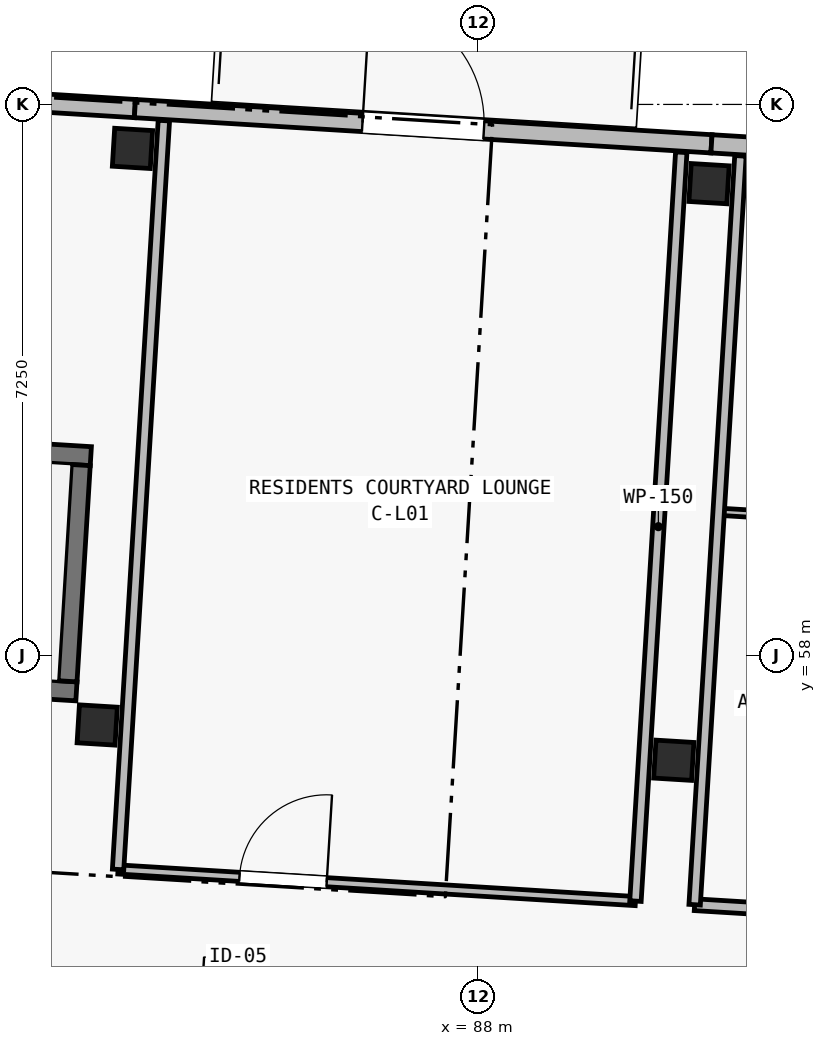
"""IFC4 building model, lengths in metres.
Left out: names, types, materials, properties, quantities, classifications, styles, units other than length and angle.
Written with IfcOpenShell. Run it as: python <this file> out.ifc"""

import sys

from ifc_helpers import new_model, si_unit, direction, frame, frame_2d, origin, origin_2d, place, context, subcontext, project, spatial, rectangle, extrude, element, fill, save


model = new_model("IFC4")
c1 = context("Model", 3, precision=1e-05, world=origin(), true_north=direction((0.0, 1.0)))
c2 = subcontext(c1, "Body", "Model", "MODEL_VIEW")
j1 = project(units=[si_unit("LENGTHUNIT", "METRE"), si_unit("PLANEANGLEUNIT", "RADIAN")], contexts=[c1])
p1 = place(None, origin())
s1 = spatial("IfcSite", under=j1, at=p1, CompositionType="ELEMENT")
p2 = place(p1, origin())
s2 = spatial("IfcBuilding", under=s1, at=p2, CompositionType="ELEMENT")
p3 = place(p2, frame((0.0, 0.0, 4.5)))
s3 = spatial("IfcBuildingStorey", under=s2, at=p3, CompositionType="ELEMENT", Elevation=4.5)
for number, where, z_axis, x_axis in (
    (1, (82.99, 57.086, 0.0), (0.0, 0.0, 1.0), (0.998, -0.061, 0.0)),
    (2, (83.454, 64.672, 0.0), (0.0, 0.0, 1.0), (0.998, -0.061, 0.0)),
    (3, (90.576, 56.622, 0.0), (0.0, 0.0, 1.0), (0.998, -0.061, 0.0)),
    (4, (91.04, 64.208, 0.0), (0.0, 0.0, 1.0), (0.998, -0.061, 0.0)),
):
    element("IfcColumn", number, at=place(p3, frame(where, z_axis=z_axis, x_axis=x_axis)), inside=s3, PredefinedType="COLUMN", context=c2, shape_type="SweptSolid", body=[
        extrude(rectangle(XDim=0.5, YDim=0.5, at=origin_2d()), origin(), (0.0, 0.0, 1.0), 3.9),
    ])
p4 = place(p3, frame((75.919, 61.05, 0.0), z_axis=(0.0, 0.0, 1.0), x_axis=(0.998135546153, -0.061036313012, 0.0)))
e5 = element("IfcWall", 5, at=p4, inside=s3, PredefinedType="SHEAR", context=c2, shape_type="SweptSolid", body=[
    extrude(rectangle(XDim=7.0, YDim=0.25, at=frame_2d((3.5, 0.0))), origin(), (0.0, 0.0, 1.0), 3.9),
])
p5 = place(p4, frame((0.45, 0.0, 0.0)))
e6 = element("IfcOpeningElement", 6, at=p5, cuts=e5, PredefinedType="OPENING", context=c2, shape_type="SweptSolid", body=[
    extrude(rectangle(XDim=0.9, YDim=2.1, at=frame_2d((0.45, 1.05))), frame((0.0, 0.14, 0.0), z_axis=(0.0, -1.0, 0.0), x_axis=(1.0, 0.0, 0.0)), (0.0, 0.0, 1.0), 0.28),
])
p6 = place(p3, frame((75.73, 57.956, 0.0), z_axis=(0.0, 0.0, 1.0), x_axis=(0.998135546153, -0.061036313012, 0.0)))
e7 = element("IfcWall", 7, at=p6, inside=s3, PredefinedType="SHEAR", context=c2, shape_type="SweptSolid", body=[
    extrude(rectangle(XDim=7.0, YDim=0.25, at=frame_2d((3.5, 0.0))), origin(), (0.0, 0.0, 1.0), 3.9),
])
p7 = place(p6, frame((0.45, 0.0, 0.0)))
e8 = element("IfcOpeningElement", 8, at=p7, cuts=e7, PredefinedType="OPENING", context=c2, shape_type="SweptSolid", body=[
    extrude(rectangle(XDim=1.05, YDim=2.15, at=frame_2d((0.525, 1.075))), frame((0.0, 0.14, 0.0), z_axis=(0.0, -1.0, 0.0), x_axis=(1.0, 0.0, 0.0)), (0.0, 0.0, 1.0), 0.28),
])
p8 = place(p3, frame((82.599, 57.661, 0.0), z_axis=(0.0, 0.0, 1.0), x_axis=(0.06107697143, 0.998133059046, 0.0)))
e9 = element("IfcWall", 9, at=p8, inside=s3, PredefinedType="SHEAR", context=c2, shape_type="SweptSolid", body=[
    extrude(rectangle(XDim=2.85, YDim=0.25, at=frame_2d((1.425, 0.0))), origin(), (0.0, 0.0, 1.0), 3.9),
])
p9 = place(p3, frame((81.115, 65.341, 0.0), z_axis=(0.0, 0.0, 1.0), x_axis=(0.998134103342, -0.061059902923, 0.0)))
e10 = element("IfcWall", 10, at=p9, inside=s3, PredefinedType="SOLIDWALL", context=c2, shape_type="SweptSolid", body=[
    extrude(rectangle(XDim=2.375, YDim=0.24, at=frame_2d((1.188, 0.0))), origin(), (0.0, 0.0, 1.0), 3.65),
])
p10 = place(p3, frame((83.486, 65.196, 0.0), z_axis=(0.0, 0.0, 1.0), x_axis=(0.998135669243, -0.061034300063, 0.0)))
e11 = element("IfcWall", 11, at=p10, inside=s3, PredefinedType="SOLIDWALL", context=c2, shape_type="SweptSolid", body=[
    extrude(rectangle(XDim=7.6, YDim=0.24, at=frame_2d((3.8, 0.0))), origin(), (0.0, 0.0, 1.0), 3.65),
])
p11 = place(p10, frame((3.0, 0.0, 0.0)))
e12 = element("IfcOpeningElement", 12, at=p11, cuts=e11, PredefinedType="OPENING", context=c2, shape_type="SweptSolid", body=[
    extrude(rectangle(XDim=1.6, YDim=2.15, at=frame_2d((0.8, 1.075))), frame((0.0, 0.135, 0.0), z_axis=(0.0, -1.0, 0.0), x_axis=(1.0, 0.0, 0.0)), (0.0, 0.0, 1.0), 0.27),
])
p12 = place(p3, frame((91.072, 64.732, 0.0), z_axis=(0.0, 0.0, 1.0), x_axis=(0.998133591969, -0.061068261669, 0.0)))
e13 = element("IfcWall", 13, at=p12, inside=s3, PredefinedType="SOLIDWALL", context=c2, shape_type="SweptSolid", body=[
    extrude(rectangle(XDim=7.6, YDim=0.24, at=frame_2d((3.8, 0.0))), origin(), (0.0, 0.0, 1.0), 3.65),
])
p13 = place(p12, frame((0.902, 0.0, 0.5)))
e14 = element("IfcOpeningElement", 14, at=p13, cuts=e13, PredefinedType="OPENING", context=c2, shape_type="SweptSolid", body=[
    extrude(rectangle(XDim=0.78, YDim=2.2, at=frame_2d((0.39, 1.1))), frame((0.0, 0.135, 0.0), z_axis=(0.0, -1.0, 0.0), x_axis=(1.0, 0.0, 0.0)), (0.0, 0.0, 1.0), 0.27),
])
p14 = place(p12, frame((5.426, 0.0, 0.44)))
e15 = element("IfcOpeningElement", 15, at=p14, cuts=e13, PredefinedType="OPENING", context=c2, shape_type="SweptSolid", body=[
    extrude(rectangle(XDim=0.86, YDim=2.36, at=frame_2d((0.43, 1.18))), frame((0.0, 0.135, 0.0), z_axis=(0.0, -1.0, 0.0), x_axis=(1.0, 0.0, 0.0)), (0.0, 0.0, 1.0), 0.27),
])
p15 = place(p3, frame((83.265, 55.185, 0.0), z_axis=(0.0, 0.0, 1.0), x_axis=(0.998135531673, -0.061036549799, 0.0)))
e16 = element("IfcWall", 16, at=p15, inside=s3, PredefinedType="PARTITIONING", context=c2, shape_type="SweptSolid", body=[
    extrude(rectangle(XDim=6.82, YDim=0.12, at=frame_2d((3.41, 0.0))), origin(), (0.0, 0.0, 1.0), 3.62),
])
p16 = place(p15, frame((1.6, 0.0, 0.0)))
e17 = element("IfcOpeningElement", 17, at=p16, cuts=e16, PredefinedType="OPENING", context=c2, shape_type="SweptSolid", body=[
    extrude(rectangle(XDim=1.15, YDim=2.15, at=frame_2d((0.575, 1.075))), frame((0.0, 0.075, 0.0), z_axis=(0.0, -1.0, 0.0), x_axis=(1.0, 0.0, 0.0)), (0.0, 0.0, 1.0), 0.15),
])
p17 = place(p3, frame((83.265, 55.185, 0.0), z_axis=(0.0, 0.0, 1.0), x_axis=(0.061046193261, 0.998134941923, 0.0)))
e18 = element("IfcWall", 18, at=p17, inside=s3, PredefinedType="PARTITIONING", context=c2, shape_type="SweptSolid", body=[
    extrude(rectangle(XDim=9.87, YDim=0.15, at=frame_2d((4.935, 0.0))), origin(), (0.0, 0.0, 1.0), 3.62),
])
p18 = place(p3, frame((90.072, 54.769, 0.0), z_axis=(0.0, 0.0, 1.0), x_axis=(0.061047700465, 0.998134849741, 0.0)))
e19 = element("IfcWall", 19, at=p18, inside=s3, PredefinedType="PARTITIONING", context=c2, shape_type="SweptSolid", body=[
    extrude(rectangle(XDim=9.87, YDim=0.15, at=frame_2d((4.935, 0.0))), origin(), (0.0, 0.0, 1.0), 3.62),
])
p19 = place(p3, frame((90.85, 54.721, 0.0), z_axis=(0.0, 0.0, 1.0), x_axis=(0.998135665032, -0.06103436893, 0.0)))
e20 = element("IfcWall", 20, at=p19, inside=s3, PredefinedType="PARTITIONING", context=c2, shape_type="SweptSolid", body=[
    extrude(rectangle(XDim=6.82, YDim=0.155, at=frame_2d((3.41, 0.0))), origin(), (0.0, 0.0, 1.0), 3.62),
])
p20 = place(p19, frame((1.205, 0.0, 0.0)))
e21 = element("IfcOpeningElement", 21, at=p20, cuts=e20, PredefinedType="OPENING", context=c2, shape_type="SweptSolid", body=[
    extrude(rectangle(XDim=1.02, YDim=2.2, at=frame_2d((0.51, 1.1))), frame((0.0, 0.093, 0.0), z_axis=(0.0, -1.0, 0.0), x_axis=(1.0, 0.0, 0.0)), (0.0, 0.0, 1.0), 0.185),
])
p21 = place(p3, frame((91.167, 59.892, 0.0), z_axis=(0.0, 0.0, 1.0), x_axis=(0.998133617109, -0.061067850767, 0.0)))
e22 = element("IfcWall", 22, at=p21, inside=s3, PredefinedType="PARTITIONING", context=c2, shape_type="SweptSolid", body=[
    extrude(rectangle(XDim=3.41, YDim=0.095, at=frame_2d((1.705, 0.0))), origin(), (0.0, 0.0, 1.0), 3.62),
])
p22 = place(p21, frame((1.255, 0.0, 0.0)))
e23 = element("IfcOpeningElement", 23, at=p22, cuts=e22, PredefinedType="OPENING", context=c2, shape_type="SweptSolid", body=[
    extrude(rectangle(XDim=0.9, YDim=2.1, at=frame_2d((0.45, 1.05))), frame((0.0, 0.062, 0.0), z_axis=(0.0, -1.0, 0.0), x_axis=(1.0, 0.0, 0.0)), (0.0, 0.0, 1.0), 0.125),
])
p23 = place(p3, frame((90.85, 54.721, 0.0), z_axis=(0.0, 0.0, 1.0), x_axis=(0.061047700465, 0.998134849741, 0.0)))
e24 = element("IfcWall", 24, at=p23, inside=s3, PredefinedType="PARTITIONING", context=c2, shape_type="SweptSolid", body=[
    extrude(rectangle(XDim=9.87, YDim=0.15, at=frame_2d((4.935, 0.0))), origin(), (0.0, 0.0, 1.0), 3.62),
])
p24 = place(p11, origin())
e25 = element("IfcDoor", 25, at=p24, inside=s3, OperationType="DOUBLE_DOOR_SINGLE_SWING", PredefinedType="DOOR", context=c2, shape_type="SweptSolid", body=[
    extrude(rectangle(XDim=1.6, YDim=2.15, at=frame_2d((0.8, 1.075))), frame((0.0, 0.025, 0.0), z_axis=(0.0, -1.0, 0.0), x_axis=(1.0, 0.0, 0.0)), (0.0, 0.0, 1.0), 0.05),
])
fill(e12, e25)
p25 = place(p16, origin())
e26 = element("IfcDoor", 26, at=p25, inside=s3, OperationType="SINGLE_SWING_RIGHT", PredefinedType="DOOR", context=c2, shape_type="SweptSolid", body=[
    extrude(rectangle(XDim=1.15, YDim=2.15, at=frame_2d((0.575, 1.075))), frame((0.0, 0.025, 0.0), z_axis=(0.0, -1.0, 0.0), x_axis=(1.0, 0.0, 0.0)), (0.0, 0.0, 1.0), 0.05),
])
fill(e17, e26)
save(model, sys.argv[1])
